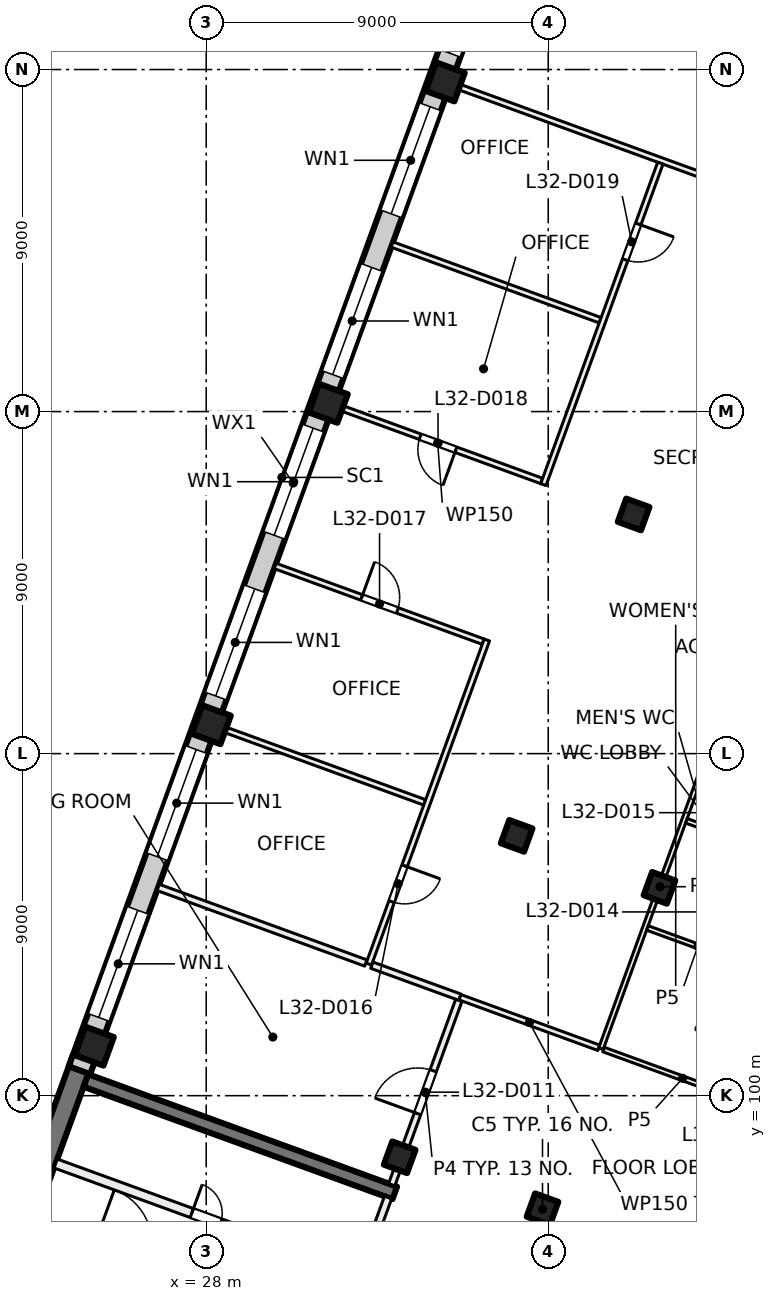
"""IFC4 building model, lengths in metres.
Left out: names, types, materials, properties, quantities, classifications, styles, units other than length and angle.
Written with IfcOpenShell. Run it as: python <this file> out.ifc"""

import sys

from ifc_helpers import new_model, si_unit, direction, frame, frame_2d, origin, origin_2d, place, context, subcontext, project, spatial, rectangle, extrude, element, fill, save


model = new_model("IFC4")
c1 = context("Model", 3, precision=1e-05, world=origin(), true_north=direction((0.0, 1.0)))
c2 = subcontext(c1, "Body", "Model", "MODEL_VIEW")
j1 = project(units=[si_unit("LENGTHUNIT", "METRE"), si_unit("PLANEANGLEUNIT", "RADIAN")], contexts=[c1])
p1 = place(None, origin())
s1 = spatial("IfcSite", under=j1, at=p1, CompositionType="ELEMENT")
p2 = place(p1, origin())
s2 = spatial("IfcBuilding", under=s1, at=p2, CompositionType="ELEMENT")
p3 = place(p2, frame((0.0, 0.0, 138.5)))
s3 = spatial("IfcBuildingStorey", under=s2, at=p3, CompositionType="ELEMENT", Elevation=138.5)
for number, where, z_axis, x_axis in (
    (1, (39.927, 105.468, 0.0), (0.0, 0.0, 1.0), (-0.342, -0.94, 0.0)),
    (2, (36.849, 97.011, 0.0), (0.0, 0.0, 1.0), (-0.342, -0.94, 0.0)),
    (3, (39.247, 115.293, 0.0), (0.0, 0.0, 1.0), (-0.342, -0.94, 0.0)),
    (4, (36.169, 106.836, 0.0), (0.0, 0.0, 1.0), (-0.342, -0.94, 0.0)),
    (5, (33.091, 98.379, 0.0), (0.0, 0.0, 1.0), (-0.342, -0.94, 0.0)),
):
    element("IfcColumn", number, at=place(p3, frame(where, z_axis=z_axis, x_axis=x_axis)), inside=s3, PredefinedType="COLUMN", context=c2, shape_type="SweptSolid", body=[
        extrude(rectangle(XDim=0.65, YDim=0.65, at=origin_2d()), origin(), (0.0, 0.0, 1.0), 4.0),
    ])
for number, where, z_axis, x_axis in (
    (6, (34.291, 126.675, 0.0), (0.0, 0.0, 1.0), (-0.342, -0.94, 0.0)),
    (7, (31.212, 118.218, 0.0), (0.0, 0.0, 1.0), (-0.342, -0.94, 0.0)),
    (8, (28.134, 109.76, 0.0), (0.0, 0.0, 1.0), (-0.342, -0.94, 0.0)),
    (9, (25.056, 101.303, 0.0), (0.0, 0.0, 1.0), (-0.342, -0.94, 0.0)),
):
    element("IfcColumn", number, at=place(p3, frame(where, z_axis=z_axis, x_axis=x_axis)), inside=s3, PredefinedType="COLUMN", context=c2, shape_type="SweptSolid", body=[
        extrude(rectangle(XDim=0.8, YDim=0.8, at=origin_2d()), origin(), (0.0, 0.0, 1.0), 4.0),
    ])
p4 = place(p3, frame((21.694, 92.577, 0.0), z_axis=(0.0, 0.0, 1.0), x_axis=(0.342010253184, 0.939696220444, 0.0)))
e10 = element("IfcWall", 10, at=p4, inside=s3, PredefinedType="SHEAR", context=c2, shape_type="SweptSolid", body=[
    extrude(rectangle(XDim=8.95, YDim=0.55, at=frame_2d((4.475, 0.0))), origin(), (0.0, 0.0, 1.0), 4.0),
])
p5 = place(p3, frame((32.962, 97.441, 0.0), z_axis=(0.0, 0.0, 1.0), x_axis=(-0.939689545667, 0.342028592028, 0.0)))
e11 = element("IfcWall", 11, at=p5, inside=s3, PredefinedType="SHEAR", context=c2, shape_type="SweptSolid", body=[
    extrude(rectangle(XDim=8.65, YDim=0.35, at=frame_2d((4.325, 0.0))), origin(), (0.0, 0.0, 1.0), 4.0),
])
p6 = place(p3, frame((24.666, 100.669, 0.0), z_axis=(0.0, 0.0, 1.0), x_axis=(0.34201964167, 0.939692803373, 0.0)))
e12 = element("IfcWall", 12, at=p6, inside=s3, PredefinedType="SOLIDWALL", context=c2, shape_type="SweptSolid", body=[
    extrude(rectangle(XDim=32.884, YDim=0.6, at=frame_2d((16.442, 0.0))), origin(), (0.0, 0.0, 1.0), 3.625),
])
p7 = place(p6, frame((1.48, 0.0, 0.9)))
e13 = element("IfcOpeningElement", 13, at=p7, cuts=e12, PredefinedType="OPENING", context=c2, shape_type="SweptSolid", body=[
    extrude(rectangle(XDim=3.0, YDim=2.4, at=frame_2d((1.5, 1.2))), frame((0.0, 0.31, 0.0), z_axis=(0.0, -1.0, 0.0), x_axis=(1.0, 0.0, 0.0)), (0.0, 0.0, 1.0), 0.62),
])
p8 = place(p6, frame((5.98, 0.0, 0.9)))
e14 = element("IfcOpeningElement", 14, at=p8, cuts=e12, PredefinedType="OPENING", context=c2, shape_type="SweptSolid", body=[
    extrude(rectangle(XDim=3.0, YDim=2.4, at=frame_2d((1.5, 1.2))), frame((0.0, 0.31, 0.0), z_axis=(0.0, -1.0, 0.0), x_axis=(1.0, 0.0, 0.0)), (0.0, 0.0, 1.0), 0.62),
])
p9 = place(p6, frame((10.48, 0.0, 0.9)))
e15 = element("IfcOpeningElement", 15, at=p9, cuts=e12, PredefinedType="OPENING", context=c2, shape_type="SweptSolid", body=[
    extrude(rectangle(XDim=3.0, YDim=2.4, at=frame_2d((1.5, 1.2))), frame((0.0, 0.31, 0.0), z_axis=(0.0, -1.0, 0.0), x_axis=(1.0, 0.0, 0.0)), (0.0, 0.0, 1.0), 0.62),
])
p10 = place(p6, frame((14.98, 0.0, 0.9)))
e16 = element("IfcOpeningElement", 16, at=p10, cuts=e12, PredefinedType="OPENING", context=c2, shape_type="SweptSolid", body=[
    extrude(rectangle(XDim=3.0, YDim=2.4, at=frame_2d((1.5, 1.2))), frame((0.0, 0.31, 0.0), z_axis=(0.0, -1.0, 0.0), x_axis=(1.0, 0.0, 0.0)), (0.0, 0.0, 1.0), 0.62),
])
p11 = place(p6, frame((19.48, 0.0, 0.9)))
e17 = element("IfcOpeningElement", 17, at=p11, cuts=e12, PredefinedType="OPENING", context=c2, shape_type="SweptSolid", body=[
    extrude(rectangle(XDim=3.0, YDim=2.4, at=frame_2d((1.5, 1.2))), frame((0.0, 0.31, 0.0), z_axis=(0.0, -1.0, 0.0), x_axis=(1.0, 0.0, 0.0)), (0.0, 0.0, 1.0), 0.62),
])
p12 = place(p6, frame((23.98, 0.0, 0.9)))
e18 = element("IfcOpeningElement", 18, at=p12, cuts=e12, PredefinedType="OPENING", context=c2, shape_type="SweptSolid", body=[
    extrude(rectangle(XDim=3.0, YDim=2.4, at=frame_2d((1.5, 1.2))), frame((0.0, 0.31, 0.0), z_axis=(0.0, -1.0, 0.0), x_axis=(1.0, 0.0, 0.0)), (0.0, 0.0, 1.0), 0.62),
])
p13 = place(p6, frame((28.48, 0.0, 0.9)))
e19 = element("IfcOpeningElement", 19, at=p13, cuts=e12, PredefinedType="OPENING", context=c2, shape_type="SweptSolid", body=[
    extrude(rectangle(XDim=3.0, YDim=2.4, at=frame_2d((1.5, 1.2))), frame((0.0, 0.31, 0.0), z_axis=(0.0, -1.0, 0.0), x_axis=(1.0, 0.0, 0.0)), (0.0, 0.0, 1.0), 0.62),
])
p14 = place(p3, frame((31.459, 93.678, 0.0), z_axis=(0.0, 0.0, 1.0), x_axis=(0.341985870128, 0.939705094502, 0.0)))
e20 = element("IfcWall", 20, at=p14, inside=s3, PredefinedType="PARTITIONING", context=c2, shape_type="SweptSolid", body=[
    extrude(rectangle(XDim=3.875, YDim=0.2, at=frame_2d((1.938, 0.0))), origin(), (0.0, 0.0, 1.0), 3.625),
])
p15 = place(p14, frame((0.3, 0.0, 0.0)))
e21 = element("IfcOpeningElement", 21, at=p15, cuts=e20, PredefinedType="OPENING", context=c2, shape_type="SweptSolid", body=[
    extrude(rectangle(XDim=1.2, YDim=2.1, at=frame_2d((0.6, 1.05))), frame((0.0, 0.11, 0.0), z_axis=(0.0, -1.0, 0.0), x_axis=(1.0, 0.0, 0.0)), (0.0, 0.0, 1.0), 0.22),
])
p16 = place(p3, frame((23.483, 96.688, 0.0), z_axis=(0.0, 0.0, 1.0), x_axis=(0.939691007314, -0.342024576271, 0.0)))
e22 = element("IfcWall", 22, at=p16, inside=s3, PredefinedType="PARTITIONING", context=c2, shape_type="SweptSolid", body=[
    extrude(rectangle(XDim=8.425, YDim=0.2, at=frame_2d((4.212, 0.0))), origin(), (0.0, 0.0, 1.0), 3.625),
])
p17 = place(p16, frame((1.688, 0.0, 0.0)))
e23 = element("IfcOpeningElement", 23, at=p17, cuts=e22, PredefinedType="OPENING", context=c2, shape_type="SweptSolid", body=[
    extrude(rectangle(XDim=1.5, YDim=2.1, at=frame_2d((0.75, 1.05))), frame((0.0, 0.11, 0.0), z_axis=(0.0, -1.0, 0.0), x_axis=(1.0, 0.0, 0.0)), (0.0, 0.0, 1.0), 0.22),
])
p18 = place(p3, frame((24.039, 98.215, 0.0), z_axis=(0.0, 0.0, 1.0), x_axis=(0.939687617333, -0.342033889887, 0.0)))
e24 = element("IfcWall", 24, at=p18, inside=s3, PredefinedType="PARTITIONING", context=c2, shape_type="SweptSolid", body=[
    extrude(rectangle(XDim=8.425, YDim=0.25, at=frame_2d((4.212, 0.0))), origin(), (0.0, 0.0, 1.0), 3.625),
])
p19 = place(p18, frame((3.812, 0.0, 0.0)))
e25 = element("IfcOpeningElement", 25, at=p19, cuts=e24, PredefinedType="OPENING", context=c2, shape_type="SweptSolid", body=[
    extrude(rectangle(XDim=0.8, YDim=2.1, at=frame_2d((0.4, 1.05))), frame((0.0, 0.135, 0.0), z_axis=(0.0, -1.0, 0.0), x_axis=(1.0, 0.0, 0.0)), (0.0, 0.0, 1.0), 0.27),
])
p20 = place(p3, frame((26.736, 105.48, 0.0), z_axis=(0.0, 0.0, 1.0), x_axis=(0.939674453825, -0.342070052516, 0.0)))
e26 = element("IfcWall", 26, at=p20, inside=s3, PredefinedType="PARTITIONING", context=c2, shape_type="SweptSolid", body=[
    extrude(rectangle(XDim=5.815, YDim=0.175, at=frame_2d((2.907, 0.0))), origin(), (0.0, 0.0, 1.0), 3.625),
])
p21 = place(p3, frame((28.275, 109.709, 0.0), z_axis=(0.0, 0.0, 1.0), x_axis=(0.939718757431, -0.341948324943, 0.0)))
e27 = element("IfcWall", 27, at=p21, inside=s3, PredefinedType="PARTITIONING", context=c2, shape_type="SweptSolid", body=[
    extrude(rectangle(XDim=5.825, YDim=0.15, at=frame_2d((2.913, 0.0))), origin(), (0.0, 0.0, 1.0), 3.625),
])
p22 = place(p3, frame((29.814, 113.938, 0.0), z_axis=(0.0, 0.0, 1.0), x_axis=(0.939738354986, -0.341894463495, 0.0)))
e28 = element("IfcWall", 28, at=p22, inside=s3, PredefinedType="PARTITIONING", context=c2, shape_type="SweptSolid", body=[
    extrude(rectangle(XDim=5.826, YDim=0.15, at=frame_2d((2.913, 0.0))), origin(), (0.0, 0.0, 1.0), 3.625),
])
p23 = place(p22, frame((2.423, 0.0, 0.0)))
e29 = element("IfcOpeningElement", 29, at=p23, cuts=e28, PredefinedType="OPENING", context=c2, shape_type="SweptSolid", body=[
    extrude(rectangle(XDim=1.0, YDim=2.1, at=frame_2d((0.5, 1.05))), frame((0.0, 0.085, 0.0), z_axis=(0.0, -1.0, 0.0), x_axis=(1.0, 0.0, 0.0)), (0.0, 0.0, 1.0), 0.17),
])
p24 = place(p3, frame((32.359, 103.433, 0.0), z_axis=(0.0, 0.0, 1.0), x_axis=(0.939784753685, -0.341766904105, 0.0)))
e30 = element("IfcWall", 30, at=p24, inside=s3, PredefinedType="PARTITIONING", context=c2, shape_type="SweptSolid", body=[
    extrude(rectangle(XDim=2.467, YDim=0.175, at=frame_2d((1.233, 0.0))), origin(), (0.0, 0.0, 1.0), 3.625),
])
p25 = place(p3, frame((32.892, 122.395, 0.0), z_axis=(0.0, 0.0, 1.0), x_axis=(0.939733456466, -0.341907927371, 0.0)))
e31 = element("IfcWall", 31, at=p25, inside=s3, PredefinedType="PARTITIONING", context=c2, shape_type="SweptSolid", body=[
    extrude(rectangle(XDim=5.826, YDim=0.15, at=frame_2d((2.913, 0.0))), origin(), (0.0, 0.0, 1.0), 3.625),
])
p26 = place(p3, frame((34.431, 126.624, 0.0), z_axis=(0.0, 0.0, 1.0), x_axis=(0.939678226331, -0.342059689177, 0.0)))
e32 = element("IfcWall", 32, at=p26, inside=s3, PredefinedType="PARTITIONING", context=c2, shape_type="SweptSolid", body=[
    extrude(rectangle(XDim=16.901, YDim=0.15, at=frame_2d((8.45, 0.0))), origin(), (0.0, 0.0, 1.0), 3.625),
])
p27 = place(p3, frame((32.881, 97.657, 0.0), z_axis=(0.0, 0.0, 1.0), x_axis=(0.342058204353, 0.939678766832, 0.0)))
e33 = element("IfcWall", 33, at=p27, inside=s3, PredefinedType="PARTITIONING", context=c2, shape_type="SweptSolid", body=[
    extrude(rectangle(XDim=5.163, YDim=0.175, at=frame_2d((2.581, 0.0))), origin(), (0.0, 0.0, 1.0), 3.625),
])
p28 = place(p27, frame((1.991, 0.0, 0.0)))
e34 = element("IfcOpeningElement", 34, at=p28, cuts=e33, PredefinedType="OPENING", context=c2, shape_type="SweptSolid", body=[
    extrude(rectangle(XDim=1.2, YDim=2.1, at=frame_2d((0.6, 1.05))), frame((0.0, 0.097, 0.0), z_axis=(0.0, -1.0, 0.0), x_axis=(1.0, 0.0, 0.0)), (0.0, 0.0, 1.0), 0.195),
])
p29 = place(p3, frame((34.677, 102.59, 0.0), z_axis=(0.0, 0.0, 1.0), x_axis=(0.939712759945, -0.341964806371, 0.0)))
e35 = element("IfcWall", 35, at=p29, inside=s3, PredefinedType="PARTITIONING", context=c2, shape_type="SweptSolid", body=[
    extrude(rectangle(XDim=3.889, YDim=0.15, at=frame_2d((1.945, 0.0))), origin(), (0.0, 0.0, 1.0), 3.625),
])
p30 = place(p3, frame((35.385, 111.99, 0.0), z_axis=(0.0, 0.0, 1.0), x_axis=(-0.342153449842, -0.939644090473, 0.0)))
e36 = element("IfcWall", 36, at=p30, inside=s3, PredefinedType="PARTITIONING", context=c2, shape_type="SweptSolid", body=[
    extrude(rectangle(XDim=9.075, YDim=0.15, at=frame_2d((4.537, 0.0))), origin(), (0.0, 0.0, 1.0), 3.625),
])
p31 = place(p30, frame((6.325, 0.0, 0.0)))
e37 = element("IfcOpeningElement", 37, at=p31, cuts=e36, PredefinedType="OPENING", context=c2, shape_type="SweptSolid", body=[
    extrude(rectangle(XDim=1.0, YDim=2.1, at=frame_2d((0.5, 1.05))), frame((0.0, 0.085, 0.0), z_axis=(0.0, -1.0, 0.0), x_axis=(1.0, 0.0, 0.0)), (0.0, 0.0, 1.0), 0.17),
])
p32 = place(p3, frame((36.828, 116.174, 0.0), z_axis=(0.0, 0.0, 1.0), x_axis=(-0.939733456466, 0.341907927371, 0.0)))
e38 = element("IfcWall", 38, at=p32, inside=s3, PredefinedType="PARTITIONING", context=c2, shape_type="SweptSolid", body=[
    extrude(rectangle(XDim=5.826, YDim=0.15, at=frame_2d((2.913, 0.0))), origin(), (0.0, 0.0, 1.0), 3.625),
])
p33 = place(p32, frame((2.403, 0.0, 0.0)))
e39 = element("IfcOpeningElement", 39, at=p33, cuts=e38, PredefinedType="OPENING", context=c2, shape_type="SweptSolid", body=[
    extrude(rectangle(XDim=1.0, YDim=2.1, at=frame_2d((0.5, 1.05))), frame((0.0, 0.085, 0.0), z_axis=(0.0, -1.0, 0.0), x_axis=(1.0, 0.0, 0.0)), (0.0, 0.0, 1.0), 0.17),
])
p34 = place(p3, frame((39.95, 124.536, 0.0), z_axis=(0.0, 0.0, 1.0), x_axis=(-0.341963022424, -0.939713409128, 0.0)))
e40 = element("IfcWall", 40, at=p34, inside=s3, PredefinedType="PARTITIONING", context=c2, shape_type="SweptSolid", body=[
    extrude(rectangle(XDim=9.001, YDim=0.15, at=frame_2d((4.5, 0.0))), origin(), (0.0, 0.0, 1.0), 3.625),
])
p35 = place(p34, frame((1.703, 0.0, 0.0)))
e41 = element("IfcOpeningElement", 41, at=p35, cuts=e40, PredefinedType="OPENING", context=c2, shape_type="SweptSolid", body=[
    extrude(rectangle(XDim=1.0, YDim=2.1, at=frame_2d((0.5, 1.05))), frame((0.0, 0.085, 0.0), z_axis=(0.0, -1.0, 0.0), x_axis=(1.0, 0.0, 0.0)), (0.0, 0.0, 1.0), 0.17),
])
p36 = place(p3, frame((38.455, 101.214, 0.0), z_axis=(0.0, 0.0, 1.0), x_axis=(0.939738687483, -0.341893549585, 0.0)))
e42 = element("IfcWall", 42, at=p36, inside=s3, PredefinedType="PARTITIONING", context=c2, shape_type="SweptSolid", body=[
    extrude(rectangle(XDim=4.429, YDim=0.125, at=frame_2d((2.214, 0.0))), origin(), (0.0, 0.0, 1.0), 3.625),
])
p37 = place(p3, frame((38.388, 101.24, 0.0), z_axis=(0.0, 0.0, 1.0), x_axis=(0.342067486799, 0.93967538782, 0.0)))
e43 = element("IfcWall", 43, at=p37, inside=s3, PredefinedType="PARTITIONING", context=c2, shape_type="SweptSolid", body=[
    extrude(rectangle(XDim=9.063, YDim=0.125, at=frame_2d((4.531, 0.0))), origin(), (0.0, 0.0, 1.0), 3.625),
])
p38 = place(p3, frame((42.264, 103.446, 0.0), z_axis=(0.0, 0.0, 1.0), x_axis=(-0.939563555473, 0.342374539396, 0.0)))
e44 = element("IfcWall", 44, at=p38, inside=s3, PredefinedType="PARTITIONING", context=c2, shape_type="SweptSolid", body=[
    extrude(rectangle(XDim=2.824, YDim=0.125, at=frame_2d((1.412, 0.0))), origin(), (0.0, 0.0, 1.0), 3.625),
])
p39 = place(p3, frame((43.29, 106.266, 0.0), z_axis=(0.0, 0.0, 1.0), x_axis=(-0.939601484935, 0.342270433294, 0.0)))
e45 = element("IfcWall", 45, at=p39, inside=s3, PredefinedType="PARTITIONING", context=c2, shape_type="SweptSolid", body=[
    extrude(rectangle(XDim=2.825, YDim=0.125, at=frame_2d((1.412, 0.0))), origin(), (0.0, 0.0, 1.0), 3.625),
])
p40 = place(p7, origin())
e46 = element("IfcWindow", 46, at=p40, inside=s3, PartitioningType="SINGLE_PANEL", PredefinedType="WINDOW", context=c2, shape_type="SweptSolid", body=[
    extrude(rectangle(XDim=3.0, YDim=2.4, at=frame_2d((1.5, 1.2))), frame((0.0, 0.03, 0.0), z_axis=(0.0, -1.0, 0.0), x_axis=(1.0, 0.0, 0.0)), (0.0, 0.0, 1.0), 0.06),
])
fill(e13, e46)
p41 = place(p8, origin())
e47 = element("IfcWindow", 47, at=p41, inside=s3, PartitioningType="SINGLE_PANEL", PredefinedType="WINDOW", context=c2, shape_type="SweptSolid", body=[
    extrude(rectangle(XDim=3.0, YDim=2.4, at=frame_2d((1.5, 1.2))), frame((0.0, 0.03, 0.0), z_axis=(0.0, -1.0, 0.0), x_axis=(1.0, 0.0, 0.0)), (0.0, 0.0, 1.0), 0.06),
])
fill(e14, e47)
p42 = place(p9, origin())
e48 = element("IfcWindow", 48, at=p42, inside=s3, PartitioningType="SINGLE_PANEL", PredefinedType="WINDOW", context=c2, shape_type="SweptSolid", body=[
    extrude(rectangle(XDim=3.0, YDim=2.4, at=frame_2d((1.5, 1.2))), frame((0.0, 0.03, 0.0), z_axis=(0.0, -1.0, 0.0), x_axis=(1.0, 0.0, 0.0)), (0.0, 0.0, 1.0), 0.06),
])
fill(e15, e48)
p43 = place(p10, origin())
e49 = element("IfcWindow", 49, at=p43, inside=s3, PartitioningType="SINGLE_PANEL", PredefinedType="WINDOW", context=c2, shape_type="SweptSolid", body=[
    extrude(rectangle(XDim=3.0, YDim=2.4, at=frame_2d((1.5, 1.2))), frame((0.0, 0.03, 0.0), z_axis=(0.0, -1.0, 0.0), x_axis=(1.0, 0.0, 0.0)), (0.0, 0.0, 1.0), 0.06),
])
fill(e16, e49)
p44 = place(p11, origin())
e50 = element("IfcWindow", 50, at=p44, inside=s3, PartitioningType="SINGLE_PANEL", PredefinedType="WINDOW", context=c2, shape_type="SweptSolid", body=[
    extrude(rectangle(XDim=3.0, YDim=2.4, at=frame_2d((1.5, 1.2))), frame((0.0, 0.03, 0.0), z_axis=(0.0, -1.0, 0.0), x_axis=(1.0, 0.0, 0.0)), (0.0, 0.0, 1.0), 0.06),
])
fill(e17, e50)
p45 = place(p12, origin())
e51 = element("IfcWindow", 51, at=p45, inside=s3, PartitioningType="SINGLE_PANEL", PredefinedType="WINDOW", context=c2, shape_type="SweptSolid", body=[
    extrude(rectangle(XDim=3.0, YDim=2.4, at=frame_2d((1.5, 1.2))), frame((0.0, 0.03, 0.0), z_axis=(0.0, -1.0, 0.0), x_axis=(1.0, 0.0, 0.0)), (0.0, 0.0, 1.0), 0.06),
])
fill(e18, e51)
p46 = place(p13, origin())
e52 = element("IfcWindow", 52, at=p46, inside=s3, PartitioningType="SINGLE_PANEL", PredefinedType="WINDOW", context=c2, shape_type="SweptSolid", body=[
    extrude(rectangle(XDim=3.0, YDim=2.4, at=frame_2d((1.5, 1.2))), frame((0.0, 0.03, 0.0), z_axis=(0.0, -1.0, 0.0), x_axis=(1.0, 0.0, 0.0)), (0.0, 0.0, 1.0), 0.06),
])
fill(e19, e52)
p47 = place(p19, origin())
e53 = element("IfcDoor", 53, at=p47, inside=s3, OperationType="SINGLE_SWING_LEFT", PredefinedType="DOOR", context=c2, shape_type="SweptSolid", body=[
    extrude(rectangle(XDim=0.8, YDim=2.1, at=frame_2d((0.4, 1.05))), frame((0.0, 0.025, 0.0), z_axis=(0.0, -1.0, 0.0), x_axis=(1.0, 0.0, 0.0)), (0.0, 0.0, 1.0), 0.05),
])
fill(e25, e53)
p48 = place(p28, origin())
e54 = element("IfcDoor", 54, at=p48, inside=s3, OperationType="DOUBLE_DOOR_SINGLE_SWING", PredefinedType="DOOR", context=c2, shape_type="SweptSolid", body=[
    extrude(rectangle(XDim=1.2, YDim=2.1, at=frame_2d((0.6, 1.05))), frame((0.0, 0.025, 0.0), z_axis=(0.0, -1.0, 0.0), x_axis=(1.0, 0.0, 0.0)), (0.0, 0.0, 1.0), 0.05),
])
fill(e34, e54)
p49 = place(p31, origin())
e55 = element("IfcDoor", 55, at=p49, inside=s3, OperationType="SINGLE_SWING_LEFT", PredefinedType="DOOR", context=c2, shape_type="SweptSolid", body=[
    extrude(rectangle(XDim=1.0, YDim=2.1, at=frame_2d((0.5, 1.05))), frame((0.0, 0.025, 0.0), z_axis=(0.0, -1.0, 0.0), x_axis=(1.0, 0.0, 0.0)), (0.0, 0.0, 1.0), 0.05),
])
fill(e37, e55)
p50 = place(p23, origin())
e56 = element("IfcDoor", 56, at=p50, inside=s3, OperationType="SINGLE_SWING_LEFT", PredefinedType="DOOR", context=c2, shape_type="SweptSolid", body=[
    extrude(rectangle(XDim=1.0, YDim=2.1, at=frame_2d((0.5, 1.05))), frame((0.0, 0.025, 0.0), z_axis=(0.0, -1.0, 0.0), x_axis=(1.0, 0.0, 0.0)), (0.0, 0.0, 1.0), 0.05),
])
fill(e29, e56)
p51 = place(p33, origin())
e57 = element("IfcDoor", 57, at=p51, inside=s3, OperationType="SINGLE_SWING_RIGHT", PredefinedType="DOOR", context=c2, shape_type="SweptSolid", body=[
    extrude(rectangle(XDim=1.0, YDim=2.1, at=frame_2d((0.5, 1.05))), frame((0.0, 0.025, 0.0), z_axis=(0.0, -1.0, 0.0), x_axis=(1.0, 0.0, 0.0)), (0.0, 0.0, 1.0), 0.05),
])
fill(e39, e57)
p52 = place(p35, origin())
e58 = element("IfcDoor", 58, at=p52, inside=s3, OperationType="SINGLE_SWING_LEFT", PredefinedType="DOOR", context=c2, shape_type="SweptSolid", body=[
    extrude(rectangle(XDim=1.0, YDim=2.1, at=frame_2d((0.5, 1.05))), frame((0.0, 0.025, 0.0), z_axis=(0.0, -1.0, 0.0), x_axis=(1.0, 0.0, 0.0)), (0.0, 0.0, 1.0), 0.05),
])
fill(e41, e58)
save(model, sys.argv[1])
